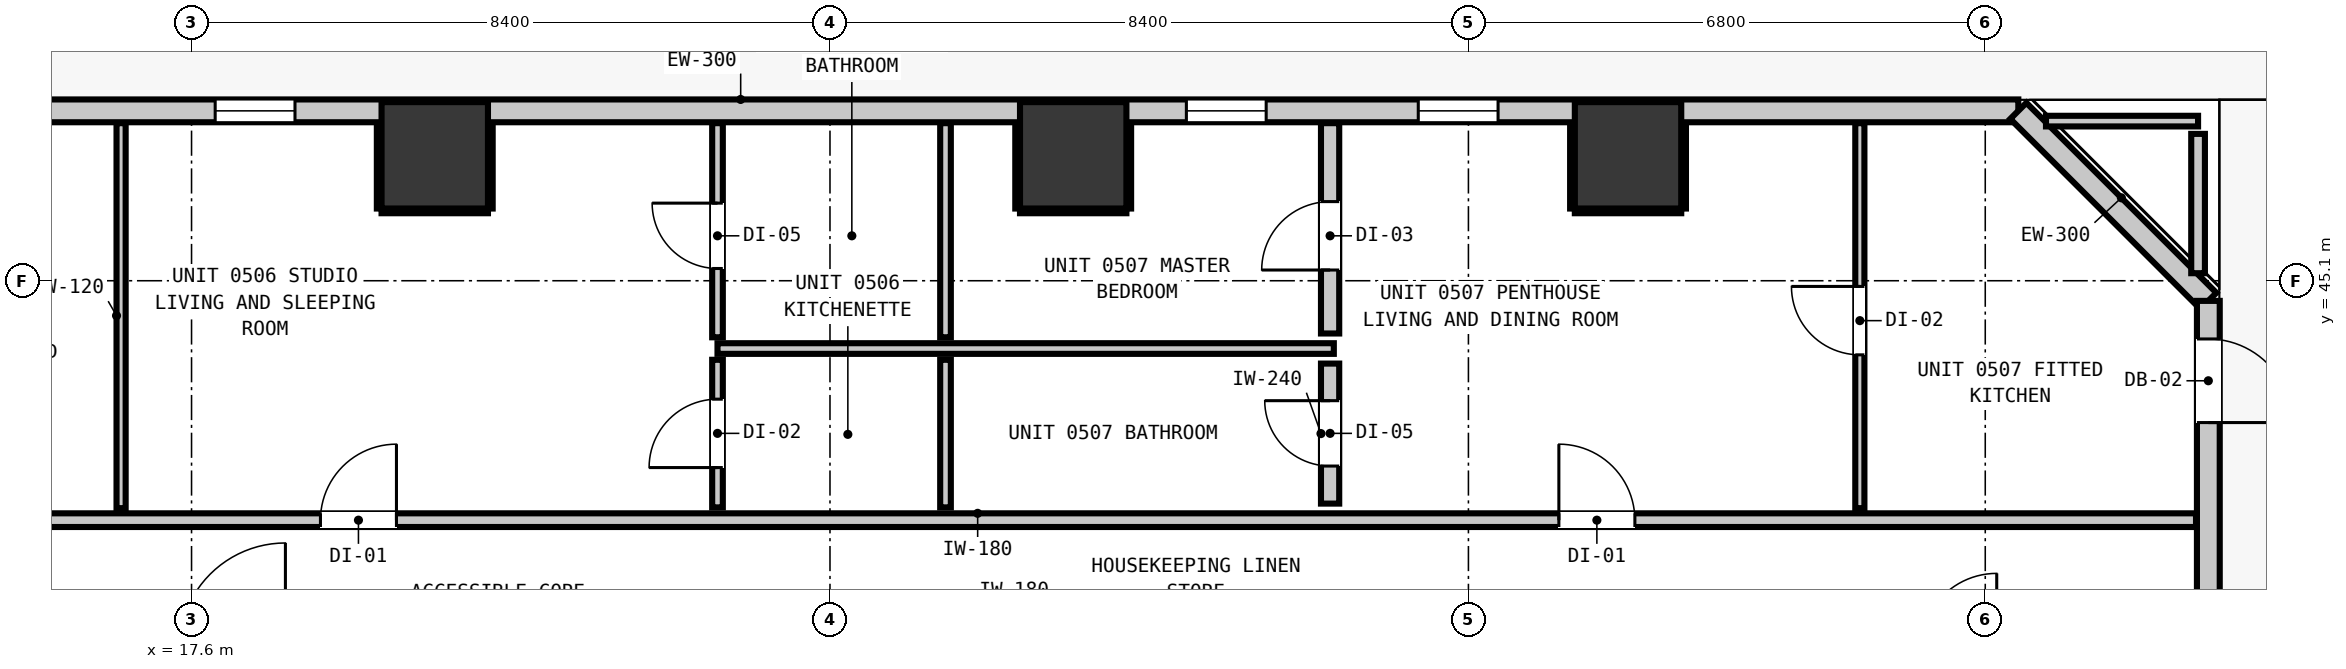
"""IFC4 building model, lengths in metres.
Left out: names, types, materials, properties, quantities, classifications, styles, units other than length and angle.
Written with IfcOpenShell. Run it as: python <this file> out.ifc"""

import sys

from ifc_helpers import new_model, si_unit, direction, frame, frame_2d, origin, origin_2d, place, context, subcontext, project, spatial, rectangle, extrude, element, fill, save


model = new_model("IFC4")
c1 = context("Model", 3, precision=1e-05, world=origin(), true_north=direction((0.0, 1.0)))
c2 = subcontext(c1, "Body", "Model", "MODEL_VIEW")
j1 = project(units=[si_unit("LENGTHUNIT", "METRE"), si_unit("PLANEANGLEUNIT", "RADIAN")], contexts=[c1])
p1 = place(None, origin())
s1 = spatial("IfcSite", under=j1, at=p1, CompositionType="ELEMENT")
p2 = place(p1, origin())
s2 = spatial("IfcBuilding", under=s1, at=p2, CompositionType="ELEMENT")
p3 = place(p2, frame((0.0, 0.0, 22.0)))
s3 = spatial("IfcBuildingStorey", under=s2, at=p3, CompositionType="ELEMENT", Elevation=22.0)
for number, where, z_axis, x_axis in (
    (1, (20.8, 46.75, -0.2), (0.0, 0.0, 1.0), (1.0, 0.0, 0.0)),
    (2, (29.2, 46.75, -0.2), (0.0, 0.0, 1.0), (1.0, 0.0, 0.0)),
    (3, (36.5, 46.75, -0.2), (0.0, 0.0, 1.0), (1.0, 0.0, 0.0)),
):
    element("IfcColumn", number, at=place(p3, frame(where, z_axis=z_axis, x_axis=x_axis)), inside=s3, PredefinedType="COLUMN", context=c2, shape_type="SweptSolid", body=[
        extrude(rectangle(XDim=1.4, YDim=1.4, at=origin_2d()), origin(), (0.0, 0.0, 1.0), 3.52),
    ])
p4 = place(p3, frame((4.165, 47.335, 0.0), z_axis=(0.0, 0.0, 1.0), x_axis=(1.0, 0.0, 0.0)))
e4 = element("IfcWall", 4, at=p4, inside=s3, PredefinedType="STANDARD", context=c2, shape_type="SweptSolid", body=[
    extrude(rectangle(XDim=37.47, YDim=0.3, at=frame_2d((18.735, 0.0))), origin(), (0.0, 0.0, 1.0), 3.06),
])
p5 = place(p4, frame((0.501, 0.0, 0.0)))
e5 = element("IfcOpeningElement", 5, at=p5, cuts=e4, PredefinedType="OPENING", context=c2, shape_type="SweptSolid", body=[
    extrude(rectangle(XDim=1.1, YDim=2.15, at=frame_2d((0.55, 1.075))), frame((0.0, 0.16, 0.0), z_axis=(0.0, -1.0, 0.0), x_axis=(1.0, 0.0, 0.0)), (0.0, 0.0, 1.0), 0.32),
])
p6 = place(p4, frame((4.543, 0.0, 0.85)))
e6 = element("IfcOpeningElement", 6, at=p6, cuts=e4, PredefinedType="OPENING", context=c2, shape_type="SweptSolid", body=[
    extrude(rectangle(XDim=1.05, YDim=1.65, at=frame_2d((0.525, 0.825))), frame((0.0, 0.16, 0.0), z_axis=(0.0, -1.0, 0.0), x_axis=(1.0, 0.0, 0.0)), (0.0, 0.0, 1.0), 0.32),
])
p7 = place(p4, frame((13.746, 0.0, 0.85)))
e7 = element("IfcOpeningElement", 7, at=p7, cuts=e4, PredefinedType="OPENING", context=c2, shape_type="SweptSolid", body=[
    extrude(rectangle(XDim=1.05, YDim=1.65, at=frame_2d((0.525, 0.825))), frame((0.0, 0.16, 0.0), z_axis=(0.0, -1.0, 0.0), x_axis=(1.0, 0.0, 0.0)), (0.0, 0.0, 1.0), 0.32),
])
p8 = place(p4, frame((29.575, 0.0, 0.85)))
e8 = element("IfcOpeningElement", 8, at=p8, cuts=e4, PredefinedType="OPENING", context=c2, shape_type="SweptSolid", body=[
    extrude(rectangle(XDim=1.05, YDim=1.65, at=frame_2d((0.525, 0.825))), frame((0.0, 0.16, 0.0), z_axis=(0.0, -1.0, 0.0), x_axis=(1.0, 0.0, 0.0)), (0.0, 0.0, 1.0), 0.32),
])
p9 = place(p4, frame((26.524, 0.0, 0.85)))
e9 = element("IfcOpeningElement", 9, at=p9, cuts=e4, PredefinedType="OPENING", context=c2, shape_type="SweptSolid", body=[
    extrude(rectangle(XDim=1.05, YDim=1.65, at=frame_2d((0.525, 0.825))), frame((0.0, 0.16, 0.0), z_axis=(0.0, -1.0, 0.0), x_axis=(1.0, 0.0, 0.0)), (0.0, 0.0, 1.0), 0.32),
])
p10 = place(p3, frame((41.635, 47.335, 0.0), z_axis=(0.0, 0.0, 1.0), x_axis=(0.707106781187, -0.707106781187, 0.0)))
e10 = element("IfcWall", 10, at=p10, inside=s3, PredefinedType="STANDARD", context=c2, shape_type="SweptSolid", body=[
    extrude(rectangle(XDim=3.536, YDim=0.3, at=frame_2d((1.768, 0.0))), origin(), (0.0, 0.0, 1.0), 3.06),
])
p11 = place(p3, frame((44.135, 44.835, 0.0), z_axis=(0.0, 0.0, 1.0), x_axis=(0.0, -1.0, 0.0)))
e11 = element("IfcWall", 11, at=p11, inside=s3, PredefinedType="STANDARD", context=c2, shape_type="SweptSolid", body=[
    extrude(rectangle(XDim=34.67, YDim=0.3, at=frame_2d((17.335, 0.0))), origin(), (0.0, 0.0, 1.0), 3.06),
])
p12 = place(p11, frame((0.501, 0.0, 0.0)))
e12 = element("IfcOpeningElement", 12, at=p12, cuts=e11, PredefinedType="OPENING", context=c2, shape_type="SweptSolid", body=[
    extrude(rectangle(XDim=1.1, YDim=2.15, at=frame_2d((0.55, 1.075))), frame((0.0, 0.16, 0.0), z_axis=(0.0, -1.0, 0.0), x_axis=(1.0, 0.0, 0.0)), (0.0, 0.0, 1.0), 0.32),
])
p13 = place(p11, frame((20.21, 0.0, 0.85)))
e13 = element("IfcOpeningElement", 13, at=p13, cuts=e11, PredefinedType="OPENING", context=c2, shape_type="SweptSolid", body=[
    extrude(rectangle(XDim=1.05, YDim=1.65, at=frame_2d((0.525, 0.825))), frame((0.0, 0.16, 0.0), z_axis=(0.0, -1.0, 0.0), x_axis=(1.0, 0.0, 0.0)), (0.0, 0.0, 1.0), 0.32),
])
p14 = place(p11, frame((7.426, 0.0, 0.85)))
e14 = element("IfcOpeningElement", 14, at=p14, cuts=e11, PredefinedType="OPENING", context=c2, shape_type="SweptSolid", body=[
    extrude(rectangle(XDim=1.05, YDim=1.65, at=frame_2d((0.525, 0.825))), frame((0.0, 0.16, 0.0), z_axis=(0.0, -1.0, 0.0), x_axis=(1.0, 0.0, 0.0)), (0.0, 0.0, 1.0), 0.32),
])
p15 = place(p3, frame((12.989, 41.95, 0.0), z_axis=(0.0, 0.0, 1.0), x_axis=(1.0, 0.0, 0.0)))
e15 = element("IfcWall", 15, at=p15, inside=s3, PredefinedType="PARTITIONING", context=c2, shape_type="SweptSolid", body=[
    extrude(rectangle(XDim=30.984, YDim=0.18, at=frame_2d((15.492, 0.0))), origin(), (0.0, 0.0, 1.0), 3.06),
])
p16 = place(p15, frame((6.307, 0.0, 0.0)))
e16 = element("IfcOpeningElement", 16, at=p16, cuts=e15, PredefinedType="OPENING", context=c2, shape_type="SweptSolid", body=[
    extrude(rectangle(XDim=1.0, YDim=2.15, at=frame_2d((0.5, 1.075))), frame((0.0, 0.1, 0.0), z_axis=(0.0, -1.0, 0.0), x_axis=(1.0, 0.0, 0.0)), (0.0, 0.0, 1.0), 0.2),
])
p17 = place(p15, frame((22.601, 0.0, 0.0)))
e17 = element("IfcOpeningElement", 17, at=p17, cuts=e15, PredefinedType="OPENING", context=c2, shape_type="SweptSolid", body=[
    extrude(rectangle(XDim=1.0, YDim=2.15, at=frame_2d((0.5, 1.075))), frame((0.0, 0.1, 0.0), z_axis=(0.0, -1.0, 0.0), x_axis=(1.0, 0.0, 0.0)), (0.0, 0.0, 1.0), 0.2),
])
p18 = place(p3, frame((24.52, 44.208, 0.0), z_axis=(0.0, 0.0, 1.0), x_axis=(1.0, 0.0, 0.0)))
e18 = element("IfcWall", 18, at=p18, inside=s3, PredefinedType="PARTITIONING", context=c2, shape_type="SweptSolid", body=[
    extrude(rectangle(XDim=8.109, YDim=0.14, at=frame_2d((4.054, 0.0))), origin(), (0.0, 0.0, 1.0), 3.06),
])
p19 = place(p3, frame((41.999, 47.2, 0.0), z_axis=(0.0, 0.0, 1.0), x_axis=(1.0, 0.0, 0.0)))
e19 = element("IfcWall", 19, at=p19, inside=s3, PredefinedType="PARTITIONING", context=c2, shape_type="SweptSolid", body=[
    extrude(rectangle(XDim=2.001, YDim=0.14, at=frame_2d((1.0, 0.0))), origin(), (0.0, 0.0, 1.0), 3.06),
])
p20 = place(p3, frame((32.58, 42.168, 0.0), z_axis=(0.0, 0.0, 1.0), x_axis=(0.0, 1.0, 0.0)))
e20 = element("IfcWall", 20, at=p20, inside=s3, PredefinedType="PARTITIONING", context=c2, shape_type="SweptSolid", body=[
    extrude(rectangle(XDim=1.842, YDim=0.24, at=frame_2d((0.921, 0.0))), origin(), (0.0, 0.0, 1.0), 3.06),
])
p21 = place(p20, frame((0.494, 0.0, 0.0)))
e21 = element("IfcOpeningElement", 21, at=p21, cuts=e20, PredefinedType="OPENING", context=c2, shape_type="SweptSolid", body=[
    extrude(rectangle(XDim=0.86, YDim=2.02, at=frame_2d((0.43, 1.01))), frame((0.0, 0.13, 0.0), z_axis=(0.0, -1.0, 0.0), x_axis=(1.0, 0.0, 0.0)), (0.0, 0.0, 1.0), 0.26),
])
p22 = place(p3, frame((32.58, 44.406, 0.0), z_axis=(0.0, 0.0, 1.0), x_axis=(0.0, 1.0, 0.0)))
e22 = element("IfcWall", 22, at=p22, inside=s3, PredefinedType="PARTITIONING", context=c2, shape_type="SweptSolid", body=[
    extrude(rectangle(XDim=2.767, YDim=0.24, at=frame_2d((1.384, 0.0))), origin(), (0.0, 0.0, 1.0), 3.06),
])
p23 = place(p22, frame((0.835, 0.0, 0.0)))
e23 = element("IfcOpeningElement", 23, at=p23, cuts=e22, PredefinedType="OPENING", context=c2, shape_type="SweptSolid", body=[
    extrude(rectangle(XDim=0.9, YDim=2.1, at=frame_2d((0.45, 1.05))), frame((0.0, 0.13, 0.0), z_axis=(0.0, -1.0, 0.0), x_axis=(1.0, 0.0, 0.0)), (0.0, 0.0, 1.0), 0.26),
])
p24 = place(p3, frame((44.0, 45.199, 0.0), z_axis=(0.0, 0.0, 1.0), x_axis=(0.0, 1.0, 0.0)))
e24 = element("IfcWall", 24, at=p24, inside=s3, PredefinedType="PARTITIONING", context=c2, shape_type="SweptSolid", body=[
    extrude(rectangle(XDim=1.833, YDim=0.18, at=frame_2d((0.917, 0.0))), origin(), (0.0, 0.0, 1.0), 3.06),
])
p25 = place(p3, frame((24.52, 42.118, 0.0), z_axis=(0.0, 0.0, 1.0), x_axis=(0.0, 1.0, 0.0)))
e25 = element("IfcWall", 25, at=p25, inside=s3, PredefinedType="PARTITIONING", context=c2, shape_type="SweptSolid", body=[
    extrude(rectangle(XDim=1.942, YDim=0.14, at=frame_2d((0.971, 0.0))), origin(), (0.0, 0.0, 1.0), 3.06),
])
p26 = place(p25, frame((0.524, 0.0, 0.0)))
e26 = element("IfcOpeningElement", 26, at=p26, cuts=e25, PredefinedType="OPENING", context=c2, shape_type="SweptSolid", body=[
    extrude(rectangle(XDim=0.9, YDim=2.1, at=frame_2d((0.45, 1.05))), frame((0.0, 0.08, 0.0), z_axis=(0.0, -1.0, 0.0), x_axis=(1.0, 0.0, 0.0)), (0.0, 0.0, 1.0), 0.16),
])
p27 = place(p3, frame((24.52, 44.356, 0.0), z_axis=(0.0, 0.0, 1.0), x_axis=(0.0, 1.0, 0.0)))
e27 = element("IfcWall", 27, at=p27, inside=s3, PredefinedType="PARTITIONING", context=c2, shape_type="SweptSolid", body=[
    extrude(rectangle(XDim=2.817, YDim=0.14, at=frame_2d((1.409, 0.0))), origin(), (0.0, 0.0, 1.0), 3.06),
])
p28 = place(p27, frame((0.905, 0.0, 0.0)))
e28 = element("IfcOpeningElement", 28, at=p28, cuts=e27, PredefinedType="OPENING", context=c2, shape_type="SweptSolid", body=[
    extrude(rectangle(XDim=0.86, YDim=2.02, at=frame_2d((0.43, 1.01))), frame((0.0, 0.08, 0.0), z_axis=(0.0, -1.0, 0.0), x_axis=(1.0, 0.0, 0.0)), (0.0, 0.0, 1.0), 0.16),
])
p29 = place(p3, frame((27.52, 42.118, 0.0), z_axis=(0.0, 0.0, 1.0), x_axis=(0.0, 1.0, 0.0)))
e29 = element("IfcWall", 29, at=p29, inside=s3, PredefinedType="PARTITIONING", context=c2, shape_type="SweptSolid", body=[
    extrude(rectangle(XDim=1.942, YDim=0.14, at=frame_2d((0.971, 0.0))), origin(), (0.0, 0.0, 1.0), 3.06),
])
p30 = place(p3, frame((27.52, 44.356, 0.0), z_axis=(0.0, 0.0, 1.0), x_axis=(0.0, 1.0, 0.0)))
e30 = element("IfcWall", 30, at=p30, inside=s3, PredefinedType="PARTITIONING", context=c2, shape_type="SweptSolid", body=[
    extrude(rectangle(XDim=2.817, YDim=0.14, at=frame_2d((1.409, 0.0))), origin(), (0.0, 0.0, 1.0), 3.06),
])
p31 = place(p3, frame((16.673, 42.108, 0.0), z_axis=(0.0, 0.0, 1.0), x_axis=(0.0, 1.0, 0.0)))
e31 = element("IfcWall", 31, at=p31, inside=s3, PredefinedType="PARTITIONING", context=c2, shape_type="SweptSolid", body=[
    extrude(rectangle(XDim=5.065, YDim=0.12, at=frame_2d((2.533, 0.0))), origin(), (0.0, 0.0, 1.0), 3.06),
])
p32 = place(p3, frame((39.55, 42.108, 0.0), z_axis=(0.0, 0.0, 1.0), x_axis=(0.0, 1.0, 0.0)))
e32 = element("IfcWall", 32, at=p32, inside=s3, PredefinedType="PARTITIONING", context=c2, shape_type="SweptSolid", body=[
    extrude(rectangle(XDim=5.065, YDim=0.12, at=frame_2d((2.533, 0.0))), origin(), (0.0, 0.0, 1.0), 3.06),
])
p33 = place(p32, frame((2.017, 0.0, 0.0)))
e33 = element("IfcOpeningElement", 33, at=p33, cuts=e32, PredefinedType="OPENING", context=c2, shape_type="SweptSolid", body=[
    extrude(rectangle(XDim=0.9, YDim=2.1, at=frame_2d((0.45, 1.05))), frame((0.0, 0.07, 0.0), z_axis=(0.0, -1.0, 0.0), x_axis=(1.0, 0.0, 0.0)), (0.0, 0.0, 1.0), 0.14),
])
p34 = place(p3, frame((20.1, 46.018, 0.0), z_axis=(0.0, 0.0, 1.0), x_axis=(1.0, 0.0, 0.0)))
e34 = element("IfcWall", 34, at=p34, inside=s3, PredefinedType="PARTITIONING", context=c2, shape_type="SweptSolid", body=[
    extrude(rectangle(XDim=1.4, YDim=0.06, at=frame_2d((0.7, 0.0))), origin(), (0.0, 0.0, 1.0), 1.45),
])
for number, where, z_axis, x_axis in (
    (35, (20.068, 46.05, 0.0), (0.0, 0.0, 1.0), (0.0, 1.0, 0.0)),
    (36, (21.532, 46.05, 0.0), (0.0, 0.0, 1.0), (0.0, 1.0, 0.0)),
):
    element("IfcWall", number, at=place(p3, frame(where, z_axis=z_axis, x_axis=x_axis)), inside=s3, PredefinedType="PARTITIONING", context=c2, shape_type="SweptSolid", body=[
        extrude(rectangle(XDim=1.12, YDim=0.06, at=frame_2d((0.56, 0.0))), origin(), (0.0, 0.0, 1.0), 1.45),
    ])
p35 = place(p3, frame((28.5, 46.018, 0.0), z_axis=(0.0, 0.0, 1.0), x_axis=(1.0, 0.0, 0.0)))
e37 = element("IfcWall", 37, at=p35, inside=s3, PredefinedType="PARTITIONING", context=c2, shape_type="SweptSolid", body=[
    extrude(rectangle(XDim=1.4, YDim=0.06, at=frame_2d((0.7, 0.0))), origin(), (0.0, 0.0, 1.0), 1.45),
])
for number, where, z_axis, x_axis in (
    (38, (28.468, 46.05, 0.0), (0.0, 0.0, 1.0), (0.0, 1.0, 0.0)),
    (39, (29.932, 46.05, 0.0), (0.0, 0.0, 1.0), (0.0, 1.0, 0.0)),
):
    element("IfcWall", number, at=place(p3, frame(where, z_axis=z_axis, x_axis=x_axis)), inside=s3, PredefinedType="PARTITIONING", context=c2, shape_type="SweptSolid", body=[
        extrude(rectangle(XDim=1.12, YDim=0.06, at=frame_2d((0.56, 0.0))), origin(), (0.0, 0.0, 1.0), 1.45),
    ])
p36 = place(p3, frame((35.8, 46.018, 0.0), z_axis=(0.0, 0.0, 1.0), x_axis=(1.0, 0.0, 0.0)))
e40 = element("IfcWall", 40, at=p36, inside=s3, PredefinedType="PARTITIONING", context=c2, shape_type="SweptSolid", body=[
    extrude(rectangle(XDim=1.4, YDim=0.06, at=frame_2d((0.7, 0.0))), origin(), (0.0, 0.0, 1.0), 1.45),
])
for number, where, z_axis, x_axis in (
    (41, (35.768, 46.05, 0.0), (0.0, 0.0, 1.0), (0.0, 1.0, 0.0)),
    (42, (37.232, 46.05, 0.0), (0.0, 0.0, 1.0), (0.0, 1.0, 0.0)),
):
    element("IfcWall", number, at=place(p3, frame(where, z_axis=z_axis, x_axis=x_axis)), inside=s3, PredefinedType="PARTITIONING", context=c2, shape_type="SweptSolid", body=[
        extrude(rectangle(XDim=1.12, YDim=0.06, at=frame_2d((0.56, 0.0))), origin(), (0.0, 0.0, 1.0), 1.45),
    ])
p37 = place(p12, origin())
e43 = element("IfcDoor", 43, at=p37, inside=s3, OperationType="SINGLE_SWING_RIGHT", PredefinedType="DOOR", context=c2, shape_type="SweptSolid", body=[
    extrude(rectangle(XDim=1.1, YDim=2.15, at=frame_2d((0.55, 1.075))), frame((0.0, 0.025, 0.0), z_axis=(0.0, -1.0, 0.0), x_axis=(1.0, 0.0, 0.0)), (0.0, 0.0, 1.0), 0.05),
])
fill(e12, e43)
p38 = place(p7, origin())
e44 = element("IfcWindow", 44, at=p38, inside=s3, PartitioningType="SINGLE_PANEL", PredefinedType="WINDOW", context=c2, shape_type="SweptSolid", body=[
    extrude(rectangle(XDim=1.05, YDim=1.65, at=frame_2d((0.525, 0.825))), frame((0.0, 0.03, 0.0), z_axis=(0.0, -1.0, 0.0), x_axis=(1.0, 0.0, 0.0)), (0.0, 0.0, 1.0), 0.06),
])
fill(e7, e44)
p39 = place(p8, origin())
e45 = element("IfcWindow", 45, at=p39, inside=s3, PartitioningType="SINGLE_PANEL", PredefinedType="WINDOW", context=c2, shape_type="SweptSolid", body=[
    extrude(rectangle(XDim=1.05, YDim=1.65, at=frame_2d((0.525, 0.825))), frame((0.0, 0.03, 0.0), z_axis=(0.0, -1.0, 0.0), x_axis=(1.0, 0.0, 0.0)), (0.0, 0.0, 1.0), 0.06),
])
fill(e8, e45)
p40 = place(p9, origin())
e46 = element("IfcWindow", 46, at=p40, inside=s3, PartitioningType="SINGLE_PANEL", PredefinedType="WINDOW", context=c2, shape_type="SweptSolid", body=[
    extrude(rectangle(XDim=1.05, YDim=1.65, at=frame_2d((0.525, 0.825))), frame((0.0, 0.03, 0.0), z_axis=(0.0, -1.0, 0.0), x_axis=(1.0, 0.0, 0.0)), (0.0, 0.0, 1.0), 0.06),
])
fill(e9, e46)
p41 = place(p16, origin())
e47 = element("IfcDoor", 47, at=p41, inside=s3, OperationType="SINGLE_SWING_RIGHT", PredefinedType="DOOR", context=c2, shape_type="SweptSolid", body=[
    extrude(rectangle(XDim=1.0, YDim=2.15, at=frame_2d((0.5, 1.075))), frame((0.0, 0.025, 0.0), z_axis=(0.0, -1.0, 0.0), x_axis=(1.0, 0.0, 0.0)), (0.0, 0.0, 1.0), 0.05),
])
fill(e16, e47)
p42 = place(p26, origin())
e48 = element("IfcDoor", 48, at=p42, inside=s3, OperationType="SINGLE_SWING_LEFT", PredefinedType="DOOR", context=c2, shape_type="SweptSolid", body=[
    extrude(rectangle(XDim=0.9, YDim=2.1, at=frame_2d((0.45, 1.05))), frame((0.0, 0.025, 0.0), z_axis=(0.0, -1.0, 0.0), x_axis=(1.0, 0.0, 0.0)), (0.0, 0.0, 1.0), 0.05),
])
fill(e26, e48)
p43 = place(p28, origin())
e49 = element("IfcDoor", 49, at=p43, inside=s3, OperationType="SINGLE_SWING_RIGHT", PredefinedType="DOOR", context=c2, shape_type="SweptSolid", body=[
    extrude(rectangle(XDim=0.86, YDim=2.02, at=frame_2d((0.43, 1.01))), frame((0.0, 0.025, 0.0), z_axis=(0.0, -1.0, 0.0), x_axis=(1.0, 0.0, 0.0)), (0.0, 0.0, 1.0), 0.05),
])
fill(e28, e49)
p44 = place(p17, origin())
e50 = element("IfcDoor", 50, at=p44, inside=s3, OperationType="SINGLE_SWING_LEFT", PredefinedType="DOOR", context=c2, shape_type="SweptSolid", body=[
    extrude(rectangle(XDim=1.0, YDim=2.15, at=frame_2d((0.5, 1.075))), frame((0.0, 0.025, 0.0), z_axis=(0.0, -1.0, 0.0), x_axis=(1.0, 0.0, 0.0)), (0.0, 0.0, 1.0), 0.05),
])
fill(e17, e50)
p45 = place(p21, origin())
e51 = element("IfcDoor", 51, at=p45, inside=s3, OperationType="SINGLE_SWING_RIGHT", PredefinedType="DOOR", context=c2, shape_type="SweptSolid", body=[
    extrude(rectangle(XDim=0.86, YDim=2.02, at=frame_2d((0.43, 1.01))), frame((0.0, 0.025, 0.0), z_axis=(0.0, -1.0, 0.0), x_axis=(1.0, 0.0, 0.0)), (0.0, 0.0, 1.0), 0.05),
])
fill(e21, e51)
p46 = place(p23, origin())
e52 = element("IfcDoor", 52, at=p46, inside=s3, OperationType="SINGLE_SWING_LEFT", PredefinedType="DOOR", context=c2, shape_type="SweptSolid", body=[
    extrude(rectangle(XDim=0.9, YDim=2.1, at=frame_2d((0.45, 1.05))), frame((0.0, 0.025, 0.0), z_axis=(0.0, -1.0, 0.0), x_axis=(1.0, 0.0, 0.0)), (0.0, 0.0, 1.0), 0.05),
])
fill(e23, e52)
p47 = place(p33, origin())
e53 = element("IfcDoor", 53, at=p47, inside=s3, OperationType="SINGLE_SWING_RIGHT", PredefinedType="DOOR", context=c2, shape_type="SweptSolid", body=[
    extrude(rectangle(XDim=0.9, YDim=2.1, at=frame_2d((0.45, 1.05))), frame((0.0, 0.025, 0.0), z_axis=(0.0, -1.0, 0.0), x_axis=(1.0, 0.0, 0.0)), (0.0, 0.0, 1.0), 0.05),
])
fill(e33, e53)
save(model, sys.argv[1])
